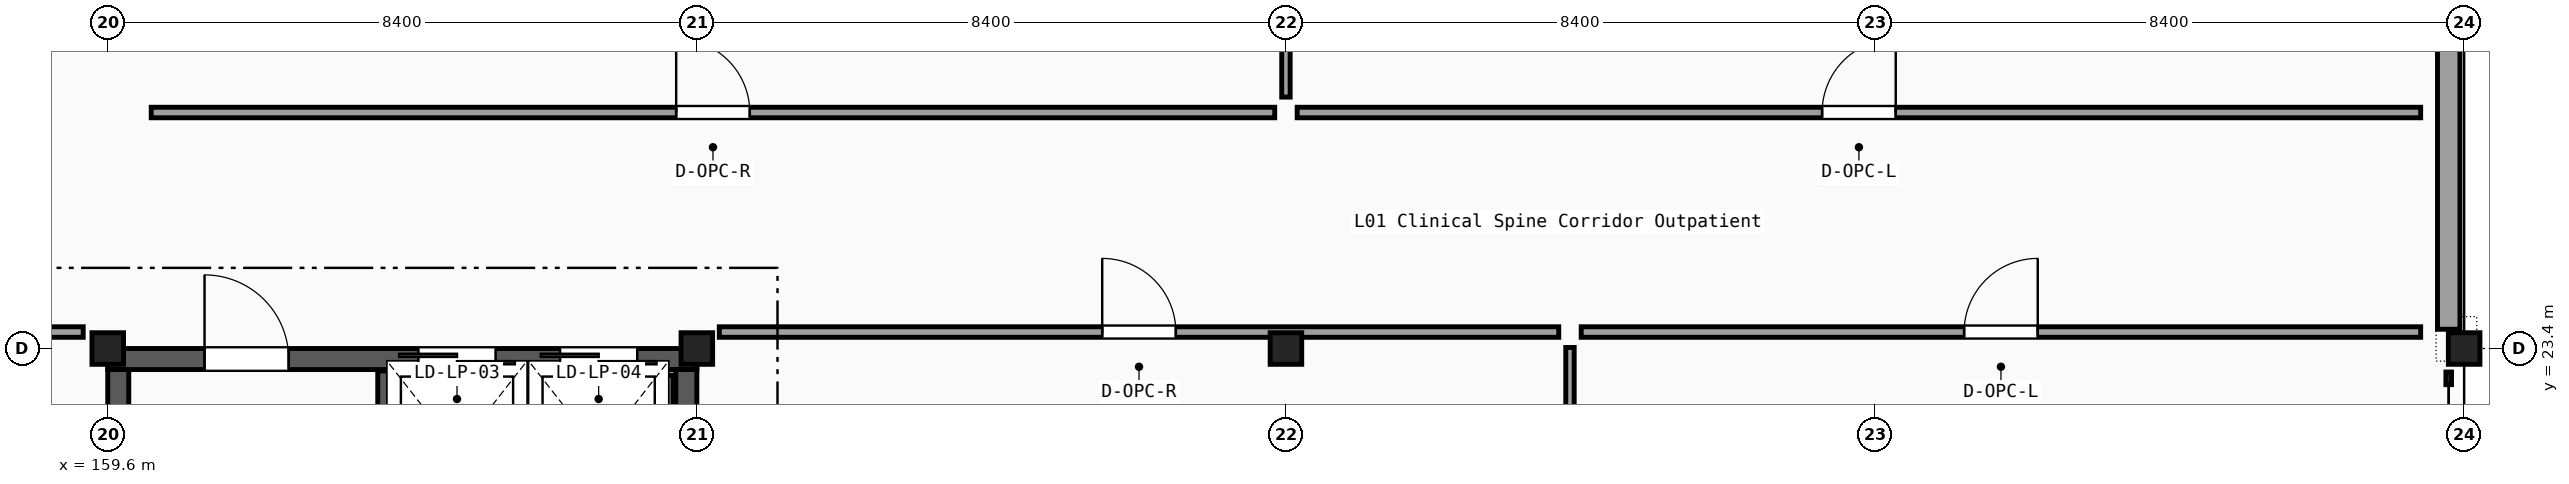
"""IFC4 building model, lengths in metres.
Left out: names, types, materials, properties, quantities, classifications, styles, units other than length and angle.
Written with IfcOpenShell. Run it as: python <this file> out.ifc"""

import sys

from ifc_helpers import new_model, si_unit, direction, frame, frame_2d, origin, origin_2d, place, context, subcontext, project, spatial, rectangle, i_section, extrude, element, fill, save


model = new_model("IFC4")
c1 = context("Model", 3, precision=1e-05, world=origin(), true_north=direction((0.0, 1.0)))
c2 = subcontext(c1, "Body", "Model", "MODEL_VIEW")
j1 = project(units=[si_unit("LENGTHUNIT", "METRE"), si_unit("PLANEANGLEUNIT", "RADIAN")], contexts=[c1])
p1 = place(None, origin())
s1 = spatial("IfcSite", under=j1, at=p1, CompositionType="ELEMENT")
p2 = place(p1, origin())
s2 = spatial("IfcBuilding", under=s1, at=p2, CompositionType="ELEMENT")
p3 = place(p2, frame((0.0, 0.0, 5.1)))
s3 = spatial("IfcBuildingStorey", under=s2, at=p3, CompositionType="ELEMENT", Elevation=5.1)
for number, where, z_axis, x_axis in (
    (1, (159.6, 23.4, 0.0), (0.0, 0.0, 1.0), (1.0, 0.0, 0.0)),
    (2, (168.0, 23.4, 0.0), (0.0, 0.0, 1.0), (1.0, 0.0, 0.0)),
    (3, (176.4, 23.4, 0.0), (0.0, 0.0, 1.0), (1.0, 0.0, 0.0)),
    (4, (193.2, 23.4, 0.0), (0.0, 0.0, 1.0), (1.0, 0.0, 0.0)),
):
    element("IfcColumn", number, at=place(p3, frame(where, z_axis=z_axis, x_axis=x_axis)), inside=s3, PredefinedType="COLUMN", context=c2, shape_type="SweptSolid", body=[
        extrude(i_section(OverallWidth=0.3, OverallDepth=0.45, WebThickness=0.014, FlangeThickness=0.026, FilletRadius=0.027, at=origin_2d()), origin(), (0.0, 0.0, 1.0), 5.1),
    ])
p4 = place(p3, frame((192.98, 23.675, 0.0), z_axis=(0.0, 0.0, 1.0), x_axis=(0.0, 1.0, 0.0)))
e5 = element("IfcWall", 5, at=p4, inside=s3, PredefinedType="SOLIDWALL", context=c2, shape_type="SweptSolid", body=[
    extrude(rectangle(XDim=7.25, YDim=0.32, at=frame_2d((3.625, 0.0))), origin(), (0.0, 0.0, 1.0), 4.35),
])
p5 = place(p3, frame((159.6, 23.25, 0.0), z_axis=(0.0, 0.0, 1.0), x_axis=(1.0, 0.0, 0.0)))
e6 = element("IfcWall", 6, at=p5, inside=s3, PredefinedType="SHEAR", context=c2, shape_type="SweptSolid", body=[
    extrude(rectangle(XDim=8.4, YDim=0.3, at=frame_2d((4.2, 0.0))), origin(), (0.0, 0.0, 1.0), 4.87),
])
p6 = place(p5, frame((1.38, 0.0, 0.0)))
e7 = element("IfcOpeningElement", 7, at=p6, cuts=e6, PredefinedType="OPENING", context=c2, shape_type="SweptSolid", body=[
    extrude(rectangle(XDim=1.2, YDim=2.15, at=frame_2d((0.6, 1.075))), frame((0.0, 0.16, 0.0), z_axis=(0.0, -1.0, 0.0), x_axis=(1.0, 0.0, 0.0)), (0.0, 0.0, 1.0), 0.32),
])
p7 = place(p5, frame((4.43, 0.0, 0.0)))
e8 = element("IfcOpeningElement", 8, at=p7, cuts=e6, PredefinedType="OPENING", context=c2, shape_type="SweptSolid", body=[
    extrude(rectangle(XDim=1.1, YDim=2.15, at=frame_2d((0.55, 1.075))), frame((0.0, 0.16, 0.0), z_axis=(0.0, -1.0, 0.0), x_axis=(1.0, 0.0, 0.0)), (0.0, 0.0, 1.0), 0.32),
])
p8 = place(p5, frame((6.45, 0.0, 0.0)))
e9 = element("IfcOpeningElement", 9, at=p8, cuts=e6, PredefinedType="OPENING", context=c2, shape_type="SweptSolid", body=[
    extrude(rectangle(XDim=1.1, YDim=2.15, at=frame_2d((0.55, 1.075))), frame((0.0, 0.16, 0.0), z_axis=(0.0, -1.0, 0.0), x_axis=(1.0, 0.0, 0.0)), (0.0, 0.0, 1.0), 0.32),
])
for number, where, z_axis, x_axis in (
    (10, (159.75, 15.9, 0.0), (0.0, 0.0, 1.0), (0.0, 1.0, 0.0)),
    (11, (167.85, 15.9, 0.0), (0.0, 0.0, 1.0), (0.0, 1.0, 0.0)),
):
    element("IfcWall", number, at=place(p3, frame(where, z_axis=z_axis, x_axis=x_axis)), inside=s3, PredefinedType="SHEAR", context=c2, shape_type="SweptSolid", body=[
        extrude(rectangle(XDim=7.2, YDim=0.3, at=frame_2d((3.6, 0.0))), origin(), (0.0, 0.0, 1.0), 4.87),
    ])
p9 = place(p3, frame((163.55, 15.92, 0.0), z_axis=(0.0, 0.0, 1.0), x_axis=(0.0, 1.0, 0.0)))
e12 = element("IfcWall", 12, at=p9, inside=s3, PredefinedType="SHEAR", context=c2, shape_type="SweptSolid", body=[
    extrude(rectangle(XDim=7.16, YDim=0.2, at=frame_2d((3.58, 0.0))), origin(), (0.0, 0.0, 1.0), 4.87),
])
for number, where, z_axis, x_axis in (
    (13, (165.54, 20.88, 0.0), (0.0, 0.0, 1.0), (0.0, 1.0, 0.0)),
    (14, (167.56, 20.88, 0.0), (0.0, 0.0, 1.0), (0.0, 1.0, 0.0)),
):
    element("IfcWall", number, at=place(p3, frame(where, z_axis=z_axis, x_axis=x_axis)), inside=s3, PredefinedType="PARTITIONING", context=c2, shape_type="SweptSolid", body=[
        extrude(rectangle(XDim=2.14, YDim=0.2, at=frame_2d((1.07, 0.0))), origin(), (0.0, 0.0, 1.0), 4.25),
    ])
p10 = place(p3, frame((151.52, 23.635, 0.0), z_axis=(0.0, 0.0, 1.0), x_axis=(1.0, 0.0, 0.0)))
e15 = element("IfcWall", 15, at=p10, inside=s3, PredefinedType="PARTITIONING", context=c2, shape_type="SweptSolid", body=[
    extrude(rectangle(XDim=7.73, YDim=0.15, at=frame_2d((3.865, 0.0))), origin(), (0.0, 0.0, 1.0), 4.35),
])
p11 = place(p10, frame((3.34, 0.0, 0.0)))
e16 = element("IfcOpeningElement", 16, at=p11, cuts=e15, PredefinedType="OPENING", context=c2, shape_type="SweptSolid", body=[
    extrude(rectangle(XDim=1.05, YDim=2.15, at=frame_2d((0.525, 1.075))), frame((0.0, 0.085, 0.0), z_axis=(0.0, -1.0, 0.0), x_axis=(1.0, 0.0, 0.0)), (0.0, 0.0, 1.0), 0.17),
])
p12 = place(p3, frame((168.32, 23.635, 0.0), z_axis=(0.0, 0.0, 1.0), x_axis=(1.0, 0.0, 0.0)))
e17 = element("IfcWall", 17, at=p12, inside=s3, PredefinedType="PARTITIONING", context=c2, shape_type="SweptSolid", body=[
    extrude(rectangle(XDim=11.97, YDim=0.15, at=frame_2d((5.985, 0.0))), origin(), (0.0, 0.0, 1.0), 4.35),
])
p13 = place(p12, frame((5.46, 0.0, 0.0)))
e18 = element("IfcOpeningElement", 18, at=p13, cuts=e17, PredefinedType="OPENING", context=c2, shape_type="SweptSolid", body=[
    extrude(rectangle(XDim=1.05, YDim=2.15, at=frame_2d((0.525, 1.075))), frame((0.0, 0.085, 0.0), z_axis=(0.0, -1.0, 0.0), x_axis=(1.0, 0.0, 0.0)), (0.0, 0.0, 1.0), 0.17),
])
p14 = place(p3, frame((180.45, 0.89, 0.0), z_axis=(0.0, 0.0, 1.0), x_axis=(0.0, 1.0, 0.0)))
e19 = element("IfcWall", 19, at=p14, inside=s3, PredefinedType="PARTITIONING", context=c2, shape_type="SweptSolid", body=[
    extrude(rectangle(XDim=22.525, YDim=0.12, at=frame_2d((11.263, 0.0))), origin(), (0.0, 0.0, 1.0), 4.35),
])
p15 = place(p3, frame((180.61, 23.635, 0.0), z_axis=(0.0, 0.0, 1.0), x_axis=(1.0, 0.0, 0.0)))
e20 = element("IfcWall", 20, at=p15, inside=s3, PredefinedType="PARTITIONING", context=c2, shape_type="SweptSolid", body=[
    extrude(rectangle(XDim=11.97, YDim=0.15, at=frame_2d((5.985, 0.0))), origin(), (0.0, 0.0, 1.0), 4.35),
])
p16 = place(p15, frame((5.46, 0.0, 0.0)))
e21 = element("IfcOpeningElement", 21, at=p16, cuts=e20, PredefinedType="OPENING", context=c2, shape_type="SweptSolid", body=[
    extrude(rectangle(XDim=1.05, YDim=2.15, at=frame_2d((0.525, 1.075))), frame((0.0, 0.085, 0.0), z_axis=(0.0, -1.0, 0.0), x_axis=(1.0, 0.0, 0.0)), (0.0, 0.0, 1.0), 0.17),
])
p17 = place(p3, frame((160.22, 26.765, 0.0), z_axis=(0.0, 0.0, 1.0), x_axis=(1.0, 0.0, 0.0)))
e22 = element("IfcWall", 22, at=p17, inside=s3, PredefinedType="PARTITIONING", context=c2, shape_type="SweptSolid", body=[
    extrude(rectangle(XDim=16.02, YDim=0.15, at=frame_2d((8.01, 0.0))), origin(), (0.0, 0.0, 1.0), 4.45),
])
p18 = place(p17, frame((7.485, 0.0, 0.0)))
e23 = element("IfcOpeningElement", 23, at=p18, cuts=e22, PredefinedType="OPENING", context=c2, shape_type="SweptSolid", body=[
    extrude(rectangle(XDim=1.05, YDim=2.15, at=frame_2d((0.525, 1.075))), frame((0.0, 0.085, 0.0), z_axis=(0.0, -1.0, 0.0), x_axis=(1.0, 0.0, 0.0)), (0.0, 0.0, 1.0), 0.17),
])
p19 = place(p3, frame((176.4, 26.985, 0.0), z_axis=(0.0, 0.0, 1.0), x_axis=(0.0, 1.0, 0.0)))
e24 = element("IfcWall", 24, at=p19, inside=s3, PredefinedType="PARTITIONING", context=c2, shape_type="SweptSolid", body=[
    extrude(rectangle(XDim=11.325, YDim=0.12, at=frame_2d((5.663, 0.0))), origin(), (0.0, 0.0, 1.0), 4.35),
])
p20 = place(p3, frame((176.56, 26.765, 0.0), z_axis=(0.0, 0.0, 1.0), x_axis=(1.0, 0.0, 0.0)))
e25 = element("IfcWall", 25, at=p20, inside=s3, PredefinedType="PARTITIONING", context=c2, shape_type="SweptSolid", body=[
    extrude(rectangle(XDim=16.02, YDim=0.15, at=frame_2d((8.01, 0.0))), origin(), (0.0, 0.0, 1.0), 4.45),
])
p21 = place(p20, frame((7.485, 0.0, 0.0)))
e26 = element("IfcOpeningElement", 26, at=p21, cuts=e25, PredefinedType="OPENING", context=c2, shape_type="SweptSolid", body=[
    extrude(rectangle(XDim=1.05, YDim=2.15, at=frame_2d((0.525, 1.075))), frame((0.0, 0.085, 0.0), z_axis=(0.0, -1.0, 0.0), x_axis=(1.0, 0.0, 0.0)), (0.0, 0.0, 1.0), 0.17),
])
p22 = place(p6, origin())
e27 = element("IfcDoor", 27, at=p22, inside=s3, OperationType="SINGLE_SWING_LEFT", PredefinedType="DOOR", context=c2, shape_type="SweptSolid", body=[
    extrude(rectangle(XDim=1.2, YDim=2.15, at=frame_2d((0.6, 1.075))), frame((0.0, 0.025, 0.0), z_axis=(0.0, -1.0, 0.0), x_axis=(1.0, 0.0, 0.0)), (0.0, 0.0, 1.0), 0.05),
])
fill(e7, e27)
p23 = place(p7, origin())
e28 = element("IfcDoor", 28, at=p23, inside=s3, OperationType="DOUBLE_DOOR_SLIDING", PredefinedType="DOOR", context=c2, shape_type="SweptSolid", body=[
    extrude(rectangle(XDim=1.1, YDim=2.15, at=frame_2d((0.55, 1.075))), frame((0.0, 0.025, 0.0), z_axis=(0.0, -1.0, 0.0), x_axis=(1.0, 0.0, 0.0)), (0.0, 0.0, 1.0), 0.05),
])
fill(e8, e28)
p24 = place(p8, origin())
e29 = element("IfcDoor", 29, at=p24, inside=s3, OperationType="DOUBLE_DOOR_SLIDING", PredefinedType="DOOR", context=c2, shape_type="SweptSolid", body=[
    extrude(rectangle(XDim=1.1, YDim=2.15, at=frame_2d((0.55, 1.075))), frame((0.0, 0.025, 0.0), z_axis=(0.0, -1.0, 0.0), x_axis=(1.0, 0.0, 0.0)), (0.0, 0.0, 1.0), 0.05),
])
fill(e9, e29)
p25 = place(p13, origin())
e30 = element("IfcDoor", 30, at=p25, inside=s3, OperationType="SINGLE_SWING_LEFT", PredefinedType="DOOR", context=c2, shape_type="SweptSolid", body=[
    extrude(rectangle(XDim=1.05, YDim=2.15, at=frame_2d((0.525, 1.075))), frame((0.0, 0.025, 0.0), z_axis=(0.0, -1.0, 0.0), x_axis=(1.0, 0.0, 0.0)), (0.0, 0.0, 1.0), 0.05),
])
fill(e18, e30)
p26 = place(p16, origin())
e31 = element("IfcDoor", 31, at=p26, inside=s3, OperationType="SINGLE_SWING_RIGHT", PredefinedType="DOOR", context=c2, shape_type="SweptSolid", body=[
    extrude(rectangle(XDim=1.05, YDim=2.15, at=frame_2d((0.525, 1.075))), frame((0.0, 0.025, 0.0), z_axis=(0.0, -1.0, 0.0), x_axis=(1.0, 0.0, 0.0)), (0.0, 0.0, 1.0), 0.05),
])
fill(e21, e31)
p27 = place(p18, origin())
e32 = element("IfcDoor", 32, at=p27, inside=s3, OperationType="SINGLE_SWING_LEFT", PredefinedType="DOOR", context=c2, shape_type="SweptSolid", body=[
    extrude(rectangle(XDim=1.05, YDim=2.15, at=frame_2d((0.525, 1.075))), frame((0.0, 0.025, 0.0), z_axis=(0.0, -1.0, 0.0), x_axis=(1.0, 0.0, 0.0)), (0.0, 0.0, 1.0), 0.05),
])
fill(e23, e32)
p28 = place(p21, origin())
e33 = element("IfcDoor", 33, at=p28, inside=s3, OperationType="SINGLE_SWING_RIGHT", PredefinedType="DOOR", context=c2, shape_type="SweptSolid", body=[
    extrude(rectangle(XDim=1.05, YDim=2.15, at=frame_2d((0.525, 1.075))), frame((0.0, 0.025, 0.0), z_axis=(0.0, -1.0, 0.0), x_axis=(1.0, 0.0, 0.0)), (0.0, 0.0, 1.0), 0.05),
])
fill(e26, e33)
save(model, sys.argv[1])
